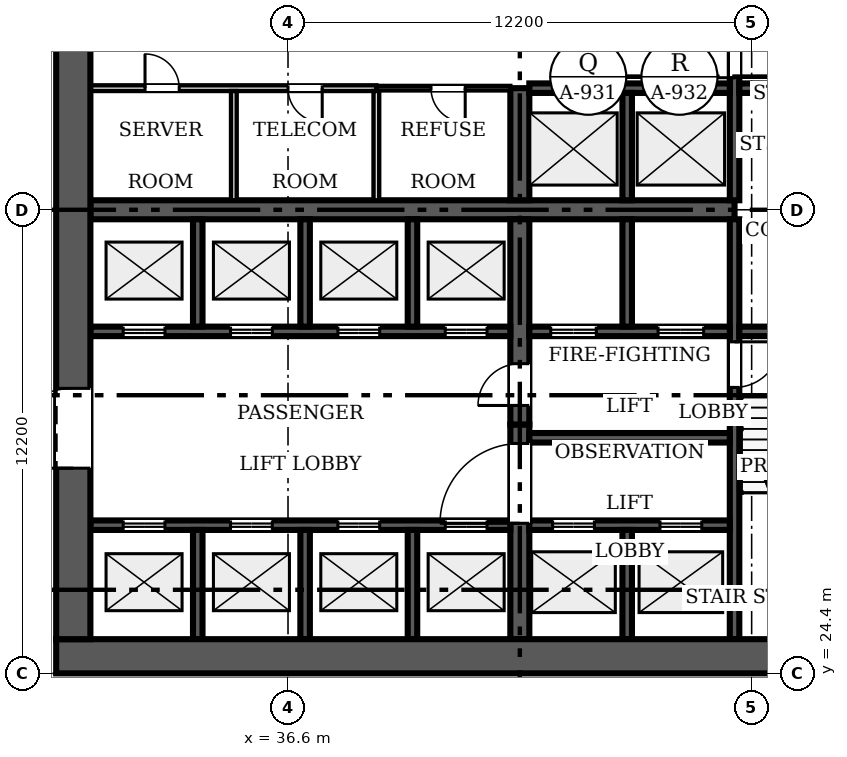
"""IFC4 building model, lengths in metres.
Left out: names, types, materials, properties, quantities, classifications, styles, units other than length and angle.
Written with IfcOpenShell. Run it as: python <this file> out.ifc"""

import sys

from ifc_helpers import new_model, si_unit, direction, frame, frame_2d, origin, place, context, subcontext, project, spatial, rectangle, extrude, source, transform, mapped, element, fill, save


model = new_model("IFC4")
c1 = context("Model", 3, precision=1e-05, world=origin(), true_north=direction((0.0, 1.0)))
c2 = subcontext(c1, "Body", "Model", "MODEL_VIEW")
j1 = project(units=[si_unit("LENGTHUNIT", "METRE"), si_unit("PLANEANGLEUNIT", "RADIAN")], contexts=[c1])
p1 = place(None, origin())
s1 = spatial("IfcSite", under=j1, at=p1, CompositionType="ELEMENT")
p2 = place(p1, origin())
s2 = spatial("IfcBuilding", under=s1, at=p2, CompositionType="ELEMENT")
p3 = place(p2, origin())
s3 = spatial("IfcBuildingStorey", under=s2, at=p3, CompositionType="ELEMENT", Elevation=0.0)
p4 = place(p3, frame((54.9, 24.85, 0.0), z_axis=(0.0, 0.0, 1.0), x_axis=(-1.0, 0.0, 0.0)))
e1 = element("IfcWall", 1, at=p4, inside=s3, PredefinedType="SHEAR", context=c2, shape_type="SweptSolid", body=[
    extrude(rectangle(XDim=24.4, YDim=0.9, at=frame_2d((12.2, 0.0))), origin(), (0.0, 0.0, 1.0), 7.2),
])
p5 = place(p3, frame((30.95, 25.3, 0.0), z_axis=(0.0, 0.0, 1.0), x_axis=(0.0, 1.0, 0.0)))
e2 = element("IfcWall", 2, at=p5, inside=s3, PredefinedType="SHEAR", context=c2, shape_type="SweptSolid", body=[
    extrude(rectangle(XDim=22.6, YDim=0.9, at=frame_2d((11.3, 0.0))), origin(), (0.0, 0.0, 1.0), 7.2),
])
m1 = source(origin(), c2, "Body", "SweptSolid", [
    extrude(rectangle(XDim=2.1, YDim=2.4, at=frame_2d((1.05, 1.2))), frame((0.0, 0.46, 0.0), z_axis=(0.0, -1.0, 0.0), x_axis=(1.0, 0.0, 0.0)), (0.0, 0.0, 1.0), 0.92),
])
p6 = place(p5, frame((4.5, 0.0, 0.0)))
e3 = element("IfcOpeningElement", 3, at=p6, cuts=e2, PredefinedType="OPENING", context=c2, shape_type="MappedRepresentation", body=[
    mapped(m1, transform((0.0, 0.0, 0.0), scale=1.0)),
])
p7 = place(p5, frame((16.0, 0.0, 0.0)))
e4 = element("IfcOpeningElement", 4, at=p7, cuts=e2, PredefinedType="OPENING", context=c2, shape_type="MappedRepresentation", body=[
    mapped(m1, transform((0.0, 0.0, 0.0), scale=1.0)),
])
p8 = place(p3, frame((31.4, 36.6, 0.0), z_axis=(0.0, 0.0, 1.0), x_axis=(1.0, 0.0, 0.0)))
e5 = element("IfcWall", 5, at=p8, inside=s3, PredefinedType="SHEAR", context=c2, shape_type="SweptSolid", body=[
    extrude(rectangle(XDim=16.95, YDim=0.5, at=frame_2d((8.475, 0.0))), origin(), (0.0, 0.0, 1.0), 7.2),
])
p9 = place(p3, frame((42.7, 25.3, 0.0), z_axis=(0.0, 0.0, 1.0), x_axis=(0.0, 1.0, 0.0)))
e6 = element("IfcWall", 6, at=p9, inside=s3, PredefinedType="SHEAR", context=c2, shape_type="SweptSolid", body=[
    extrude(rectangle(XDim=5.65, YDim=0.5, at=frame_2d((2.825, 0.0))), origin(), (0.0, 0.0, 1.0), 7.2),
])
m2 = source(origin(), c2, "Body", "SweptSolid", [
    extrude(rectangle(XDim=2.1, YDim=2.4, at=frame_2d((1.05, 1.2))), frame((0.0, 0.26, 0.0), z_axis=(0.0, -1.0, 0.0), x_axis=(1.0, 0.0, 0.0)), (0.0, 0.0, 1.0), 0.52),
])
p10 = place(p9, frame((3.05, 0.0, 0.0)))
e7 = element("IfcOpeningElement", 7, at=p10, cuts=e6, PredefinedType="OPENING", context=c2, shape_type="MappedRepresentation", body=[
    mapped(m2, transform((0.0, 0.0, 0.0), scale=1.0)),
])
p11 = place(p3, frame((42.7, 36.35, 0.0), z_axis=(0.0, 0.0, 1.0), x_axis=(0.0, -1.0, 0.0)))
e8 = element("IfcWall", 8, at=p11, inside=s3, PredefinedType="SHEAR", context=c2, shape_type="SweptSolid", body=[
    extrude(rectangle(XDim=5.4, YDim=0.5, at=frame_2d((2.7, 0.0))), origin(), (0.0, 0.0, 1.0), 7.2),
])
m3 = source(origin(), c2, "Body", "SweptSolid", [
    extrude(rectangle(XDim=1.1, YDim=2.1, at=frame_2d((0.55, 1.05))), frame((0.0, 0.26, 0.0), z_axis=(0.0, -1.0, 0.0), x_axis=(1.0, 0.0, 0.0)), (0.0, 0.0, 1.0), 0.52),
])
p12 = place(p11, frame((3.8, 0.0, 0.0)))
e9 = element("IfcOpeningElement", 9, at=p12, cuts=e8, PredefinedType="OPENING", context=c2, shape_type="MappedRepresentation", body=[
    mapped(m3, transform((0.0, 0.0, 0.0), scale=1.0)),
])
p13 = place(p3, frame((42.7, 36.85, 0.0), z_axis=(0.0, 0.0, 1.0), x_axis=(0.0, 1.0, 0.0)))
e10 = element("IfcWall", 10, at=p13, inside=s3, PredefinedType="SHEAR", context=c2, shape_type="SweptSolid", body=[
    extrude(rectangle(XDim=2.95, YDim=0.5, at=frame_2d((1.475, 0.0))), origin(), (0.0, 0.0, 1.0), 7.2),
])
p14 = place(p3, frame((48.35, 36.35, 0.0), z_axis=(0.0, 0.0, 1.0), x_axis=(0.0, -1.0, 0.0)))
e11 = element("IfcWall", 11, at=p14, inside=s3, PredefinedType="SOLIDWALL", context=c2, shape_type="SweptSolid", body=[
    extrude(rectangle(XDim=11.05, YDim=0.25, at=frame_2d((5.525, 0.0))), origin(), (0.0, 0.0, 1.0), 7.2),
])
m4 = source(origin(), c2, "Body", "SweptSolid", [
    extrude(rectangle(XDim=1.2, YDim=2.1, at=frame_2d((0.6, 1.05))), frame((0.0, 0.135, 0.0), z_axis=(0.0, -1.0, 0.0), x_axis=(1.0, 0.0, 0.0)), (0.0, 0.0, 1.0), 0.27),
])
p15 = place(p14, frame((3.225, 0.0, 0.0)))
e12 = element("IfcOpeningElement", 12, at=p15, cuts=e11, PredefinedType="OPENING", context=c2, shape_type="MappedRepresentation", body=[
    mapped(m4, transform((0.0, 0.0, 0.0), scale=1.0)),
])
p16 = place(p3, frame((48.35, 47.9, 0.0), z_axis=(0.0, 0.0, 1.0), x_axis=(0.0, -1.0, 0.0)))
e13 = element("IfcWall", 13, at=p16, inside=s3, PredefinedType="SOLIDWALL", context=c2, shape_type="SweptSolid", body=[
    extrude(rectangle(XDim=11.05, YDim=0.25, at=frame_2d((5.525, 0.0))), origin(), (0.0, 0.0, 1.0), 7.2),
])
p17 = place(p16, frame((6.625, 0.0, 0.0)))
e14 = element("IfcOpeningElement", 14, at=p17, cuts=e13, PredefinedType="OPENING", context=c2, shape_type="MappedRepresentation", body=[
    mapped(m4, transform((0.0, 0.0, 0.0), scale=1.0)),
])
p18 = place(p3, frame((42.45, 33.4, 0.0), z_axis=(0.0, 0.0, 1.0), x_axis=(-1.0, 0.0, 0.0)))
e15 = element("IfcWall", 15, at=p18, inside=s3, PredefinedType="SOLIDWALL", context=c2, shape_type="SweptSolid", body=[
    extrude(rectangle(XDim=11.05, YDim=0.25, at=frame_2d((5.525, 0.0))), origin(), (0.0, 0.0, 1.0), 7.2),
])
m5 = source(origin(), c2, "Body", "SweptSolid", [
    extrude(rectangle(XDim=1.1, YDim=2.1, at=frame_2d((0.55, 1.05))), frame((0.0, 0.135, 0.0), z_axis=(0.0, -1.0, 0.0), x_axis=(1.0, 0.0, 0.0)), (0.0, 0.0, 1.0), 0.27),
])
p19 = place(p18, frame((9.087, 0.0, 0.0)))
e16 = element("IfcOpeningElement", 16, at=p19, cuts=e15, PredefinedType="OPENING", context=c2, shape_type="MappedRepresentation", body=[
    mapped(m5, transform((0.0, 0.0, 0.0), scale=1.0)),
])
p20 = place(p18, frame((6.262, 0.0, 0.0)))
e17 = element("IfcOpeningElement", 17, at=p20, cuts=e15, PredefinedType="OPENING", context=c2, shape_type="MappedRepresentation", body=[
    mapped(m5, transform((0.0, 0.0, 0.0), scale=1.0)),
])
p21 = place(p18, frame((3.438, 0.0, 0.0)))
e18 = element("IfcOpeningElement", 18, at=p21, cuts=e15, PredefinedType="OPENING", context=c2, shape_type="MappedRepresentation", body=[
    mapped(m5, transform((0.0, 0.0, 0.0), scale=1.0)),
])
p22 = place(p18, frame((0.613, 0.0, 0.0)))
e19 = element("IfcOpeningElement", 19, at=p22, cuts=e15, PredefinedType="OPENING", context=c2, shape_type="MappedRepresentation", body=[
    mapped(m5, transform((0.0, 0.0, 0.0), scale=1.0)),
])
p23 = place(p3, frame((48.225, 33.4, 0.0), z_axis=(0.0, 0.0, 1.0), x_axis=(-1.0, 0.0, 0.0)))
e20 = element("IfcWall", 20, at=p23, inside=s3, PredefinedType="SOLIDWALL", context=c2, shape_type="SweptSolid", body=[
    extrude(rectangle(XDim=5.275, YDim=0.25, at=frame_2d((2.638, 0.0))), origin(), (0.0, 0.0, 1.0), 7.2),
])
p24 = place(p23, frame((3.512, 0.0, 0.0)))
e21 = element("IfcOpeningElement", 21, at=p24, cuts=e20, PredefinedType="OPENING", context=c2, shape_type="MappedRepresentation", body=[
    mapped(m4, transform((0.0, 0.0, 0.0), scale=1.0)),
])
p25 = place(p23, frame((0.688, 0.0, 0.0)))
e22 = element("IfcOpeningElement", 22, at=p25, cuts=e20, PredefinedType="OPENING", context=c2, shape_type="MappedRepresentation", body=[
    mapped(m4, transform((0.0, 0.0, 0.0), scale=1.0)),
])
p26 = place(p3, frame((48.475, 33.4, 0.0), z_axis=(0.0, 0.0, 1.0), x_axis=(1.0, 0.0, 0.0)))
e23 = element("IfcWall", 23, at=p26, inside=s3, PredefinedType="SOLIDWALL", context=c2, shape_type="SweptSolid", body=[
    extrude(rectangle(XDim=3.4, YDim=0.25, at=frame_2d((1.7, 0.0))), origin(), (0.0, 0.0, 1.0), 7.2),
])
p27 = place(p3, frame((31.4, 28.3, 0.0), z_axis=(0.0, 0.0, 1.0), x_axis=(1.0, 0.0, 0.0)))
e24 = element("IfcWall", 24, at=p27, inside=s3, PredefinedType="SOLIDWALL", context=c2, shape_type="SweptSolid", body=[
    extrude(rectangle(XDim=11.05, YDim=0.25, at=frame_2d((5.525, 0.0))), origin(), (0.0, 0.0, 1.0), 7.2),
])
p28 = place(p27, frame((0.863, 0.0, 0.0)))
e25 = element("IfcOpeningElement", 25, at=p28, cuts=e24, PredefinedType="OPENING", context=c2, shape_type="MappedRepresentation", body=[
    mapped(m5, transform((0.0, 0.0, 0.0), scale=1.0)),
])
p29 = place(p27, frame((3.688, 0.0, 0.0)))
e26 = element("IfcOpeningElement", 26, at=p29, cuts=e24, PredefinedType="OPENING", context=c2, shape_type="MappedRepresentation", body=[
    mapped(m5, transform((0.0, 0.0, 0.0), scale=1.0)),
])
p30 = place(p27, frame((6.512, 0.0, 0.0)))
e27 = element("IfcOpeningElement", 27, at=p30, cuts=e24, PredefinedType="OPENING", context=c2, shape_type="MappedRepresentation", body=[
    mapped(m5, transform((0.0, 0.0, 0.0), scale=1.0)),
])
p31 = place(p27, frame((9.337, 0.0, 0.0)))
e28 = element("IfcOpeningElement", 28, at=p31, cuts=e24, PredefinedType="OPENING", context=c2, shape_type="MappedRepresentation", body=[
    mapped(m5, transform((0.0, 0.0, 0.0), scale=1.0)),
])
p32 = place(p3, frame((42.95, 28.3, 0.0), z_axis=(0.0, 0.0, 1.0), x_axis=(1.0, 0.0, 0.0)))
e29 = element("IfcWall", 29, at=p32, inside=s3, PredefinedType="SOLIDWALL", context=c2, shape_type="SweptSolid", body=[
    extrude(rectangle(XDim=5.275, YDim=0.25, at=frame_2d((2.638, 0.0))), origin(), (0.0, 0.0, 1.0), 7.2),
])
p33 = place(p32, frame((0.613, 0.0, 0.0)))
e30 = element("IfcOpeningElement", 30, at=p33, cuts=e29, PredefinedType="OPENING", context=c2, shape_type="MappedRepresentation", body=[
    mapped(m5, transform((0.0, 0.0, 0.0), scale=1.0)),
])
p34 = place(p32, frame((3.438, 0.0, 0.0)))
e31 = element("IfcOpeningElement", 31, at=p34, cuts=e29, PredefinedType="OPENING", context=c2, shape_type="MappedRepresentation", body=[
    mapped(m5, transform((0.0, 0.0, 0.0), scale=1.0)),
])
p35 = place(p3, frame((42.95, 39.8, 0.0), z_axis=(0.0, 0.0, 1.0), x_axis=(1.0, 0.0, 0.0)))
e32 = element("IfcWall", 32, at=p35, inside=s3, PredefinedType="SOLIDWALL", context=c2, shape_type="SweptSolid", body=[
    extrude(rectangle(XDim=5.275, YDim=0.25, at=frame_2d((2.638, 0.0))), origin(), (0.0, 0.0, 1.0), 7.2),
])
p36 = place(p35, frame((0.613, 0.0, 0.0)))
e33 = element("IfcOpeningElement", 33, at=p36, cuts=e32, PredefinedType="OPENING", context=c2, shape_type="MappedRepresentation", body=[
    mapped(m5, transform((0.0, 0.0, 0.0), scale=1.0)),
])
p37 = place(p35, frame((3.438, 0.0, 0.0)))
e34 = element("IfcOpeningElement", 34, at=p37, cuts=e32, PredefinedType="OPENING", context=c2, shape_type="MappedRepresentation", body=[
    mapped(m5, transform((0.0, 0.0, 0.0), scale=1.0)),
])
p38 = place(p3, frame((48.475, 39.8, 0.0), z_axis=(0.0, 0.0, 1.0), x_axis=(1.0, 0.0, 0.0)))
e35 = element("IfcWall", 35, at=p38, inside=s3, PredefinedType="SOLIDWALL", context=c2, shape_type="SweptSolid", body=[
    extrude(rectangle(XDim=3.4, YDim=0.25, at=frame_2d((1.7, 0.0))), origin(), (0.0, 0.0, 1.0), 7.2),
])
p39 = place(p3, frame((45.525, 33.525, 0.0), z_axis=(0.0, 0.0, 1.0), x_axis=(0.0, 1.0, 0.0)))
e36 = element("IfcWall", 36, at=p39, inside=s3, PredefinedType="SOLIDWALL", context=c2, shape_type="SweptSolid", body=[
    extrude(rectangle(XDim=2.825, YDim=0.25, at=frame_2d((1.413, 0.0))), origin(), (0.0, 0.0, 1.0), 7.2),
])
p40 = place(p3, frame((45.525, 36.85, 0.0), z_axis=(0.0, 0.0, 1.0), x_axis=(0.0, 1.0, 0.0)))
e37 = element("IfcWall", 37, at=p40, inside=s3, PredefinedType="SOLIDWALL", context=c2, shape_type="SweptSolid", body=[
    extrude(rectangle(XDim=2.825, YDim=0.25, at=frame_2d((1.413, 0.0))), origin(), (0.0, 0.0, 1.0), 7.2),
])
p41 = place(p3, frame((42.95, 30.6, 0.0), z_axis=(0.0, 0.0, 1.0), x_axis=(1.0, 0.0, 0.0)))
e38 = element("IfcWall", 38, at=p41, inside=s3, PredefinedType="SOLIDWALL", context=c2, shape_type="SweptSolid", body=[
    extrude(rectangle(XDim=5.275, YDim=0.25, at=frame_2d((2.638, 0.0))), origin(), (0.0, 0.0, 1.0), 7.2),
])
for number, where, z_axis, x_axis in (
    (39, (34.225, 33.525, 0.0), (0.0, 0.0, 1.0), (0.0, 1.0, 0.0)),
    (40, (37.05, 33.525, 0.0), (0.0, 0.0, 1.0), (0.0, 1.0, 0.0)),
    (41, (39.875, 33.525, 0.0), (0.0, 0.0, 1.0), (0.0, 1.0, 0.0)),
):
    element("IfcWall", number, at=place(p3, frame(where, z_axis=z_axis, x_axis=x_axis)), inside=s3, PredefinedType="SOLIDWALL", context=c2, shape_type="SweptSolid", body=[
        extrude(rectangle(XDim=2.825, YDim=0.25, at=frame_2d((1.413, 0.0))), origin(), (0.0, 0.0, 1.0), 7.2),
    ])
for number, where, z_axis, x_axis in (
    (42, (34.225, 25.3, 0.0), (0.0, 0.0, 1.0), (0.0, 1.0, 0.0)),
    (43, (37.05, 25.3, 0.0), (0.0, 0.0, 1.0), (0.0, 1.0, 0.0)),
    (44, (39.875, 25.3, 0.0), (0.0, 0.0, 1.0), (0.0, 1.0, 0.0)),
    (45, (45.525, 25.3, 0.0), (0.0, 0.0, 1.0), (0.0, 1.0, 0.0)),
):
    element("IfcWall", number, at=place(p3, frame(where, z_axis=z_axis, x_axis=x_axis)), inside=s3, PredefinedType="SOLIDWALL", context=c2, shape_type="SweptSolid", body=[
        extrude(rectangle(XDim=2.875, YDim=0.25, at=frame_2d((1.438, 0.0))), origin(), (0.0, 0.0, 1.0), 7.2),
    ])
p42 = place(p3, frame((38.925, 39.8, 0.0), z_axis=(0.0, 0.0, 1.0), x_axis=(-1.0, 0.0, 0.0)))
e46 = element("IfcWall", 46, at=p42, inside=s3, PredefinedType="PARTITIONING", context=c2, shape_type="SweptSolid", body=[
    extrude(rectangle(XDim=7.525, YDim=0.15, at=frame_2d((3.763, 0.0))), origin(), (0.0, 0.0, 1.0), 6.95),
])
m6 = source(origin(), c2, "Body", "SweptSolid", [
    extrude(rectangle(XDim=0.9, YDim=2.1, at=frame_2d((0.45, 1.05))), frame((0.0, 0.085, 0.0), z_axis=(0.0, -1.0, 0.0), x_axis=(1.0, 0.0, 0.0)), (0.0, 0.0, 1.0), 0.17),
])
p43 = place(p42, frame((5.188, 0.0, 0.0)))
e47 = element("IfcOpeningElement", 47, at=p43, cuts=e46, PredefinedType="OPENING", context=c2, shape_type="MappedRepresentation", body=[
    mapped(m6, transform((0.0, 0.0, 0.0), scale=1.0)),
])
p44 = place(p42, frame((1.425, 0.0, 0.0)))
e48 = element("IfcOpeningElement", 48, at=p44, cuts=e46, PredefinedType="OPENING", context=c2, shape_type="MappedRepresentation", body=[
    mapped(m6, transform((0.0, 0.0, 0.0), scale=1.0)),
])
p45 = place(p3, frame((42.45, 39.8, 0.0), z_axis=(0.0, 0.0, 1.0), x_axis=(-1.0, 0.0, 0.0)))
e49 = element("IfcWall", 49, at=p45, inside=s3, PredefinedType="PARTITIONING", context=c2, shape_type="SweptSolid", body=[
    extrude(rectangle(XDim=3.525, YDim=0.12, at=frame_2d((1.762, 0.0))), origin(), (0.0, 0.0, 1.0), 6.95),
])
m7 = source(origin(), c2, "Body", "SweptSolid", [
    extrude(rectangle(XDim=0.9, YDim=2.1, at=frame_2d((0.45, 1.05))), frame((0.0, 0.07, 0.0), z_axis=(0.0, -1.0, 0.0), x_axis=(1.0, 0.0, 0.0)), (0.0, 0.0, 1.0), 0.14),
])
p46 = place(p45, frame((1.188, 0.0, 0.0)))
e50 = element("IfcOpeningElement", 50, at=p46, cuts=e49, PredefinedType="OPENING", context=c2, shape_type="MappedRepresentation", body=[
    mapped(m7, transform((0.0, 0.0, 0.0), scale=1.0)),
])
for number, where, z_axis, x_axis in (
    (51, (35.175, 36.85, 0.0), (0.0, 0.0, 1.0), (0.0, 1.0, 0.0)),
    (52, (38.925, 36.85, 0.0), (0.0, 0.0, 1.0), (0.0, 1.0, 0.0)),
):
    element("IfcWall", number, at=place(p3, frame(where, z_axis=z_axis, x_axis=x_axis)), inside=s3, PredefinedType="PARTITIONING", context=c2, shape_type="SweptSolid", body=[
        extrude(rectangle(XDim=2.875, YDim=0.15, at=frame_2d((1.438, 0.0))), origin(), (0.0, 0.0, 1.0), 6.95),
    ])
m8 = source(origin(), c2, "Body", "SweptSolid", [
    extrude(rectangle(XDim=2.1, YDim=2.4, at=frame_2d((1.05, 1.2))), frame((0.0, 0.025, 0.0), z_axis=(0.0, -1.0, 0.0), x_axis=(1.0, 0.0, 0.0)), (0.0, 0.0, 1.0), 0.05),
])
p47 = place(p6, origin())
e53 = element("IfcDoor", 53, at=p47, inside=s3, OperationType="DOUBLE_DOOR_SINGLE_SWING", PredefinedType="DOOR", context=c2, shape_type="MappedRepresentation", body=[
    mapped(m8, transform((0.0, 0.0, 0.0), scale=1.0)),
])
fill(e3, e53)
p48 = place(p10, origin())
e54 = element("IfcDoor", 54, at=p48, inside=s3, OperationType="DOUBLE_DOOR_SINGLE_SWING", PredefinedType="DOOR", context=c2, shape_type="MappedRepresentation", body=[
    mapped(m8, transform((0.0, 0.0, 0.0), scale=1.0)),
])
fill(e7, e54)
m9 = source(origin(), c2, "Body", "SweptSolid", [
    extrude(rectangle(XDim=1.1, YDim=2.1, at=frame_2d((0.55, 1.05))), frame((0.0, 0.025, 0.0), z_axis=(0.0, -1.0, 0.0), x_axis=(1.0, 0.0, 0.0)), (0.0, 0.0, 1.0), 0.05),
])
p49 = place(p12, origin())
e55 = element("IfcDoor", 55, at=p49, inside=s3, OperationType="SINGLE_SWING_RIGHT", PredefinedType="DOOR", context=c2, shape_type="MappedRepresentation", body=[
    mapped(m9, transform((0.0, 0.0, 0.0), scale=1.0)),
])
fill(e9, e55)
m10 = source(origin(), c2, "Body", "SweptSolid", [
    extrude(rectangle(XDim=1.2, YDim=2.1, at=frame_2d((0.6, 1.05))), frame((0.0, 0.025, 0.0), z_axis=(0.0, -1.0, 0.0), x_axis=(1.0, 0.0, 0.0)), (0.0, 0.0, 1.0), 0.05),
])
p50 = place(p15, origin())
e56 = element("IfcDoor", 56, at=p50, inside=s3, OperationType="SINGLE_SWING_LEFT", PredefinedType="DOOR", context=c2, shape_type="MappedRepresentation", body=[
    mapped(m10, transform((0.0, 0.0, 0.0), scale=1.0)),
])
fill(e12, e56)
p51 = place(p17, origin())
e57 = element("IfcDoor", 57, at=p51, inside=s3, OperationType="SINGLE_SWING_RIGHT", PredefinedType="DOOR", context=c2, shape_type="MappedRepresentation", body=[
    mapped(m10, transform((0.0, 0.0, 0.0), scale=1.0)),
])
fill(e14, e57)
p52 = place(p19, origin())
e58 = element("IfcDoor", 58, at=p52, inside=s3, OperationType="DOUBLE_DOOR_SLIDING", PredefinedType="DOOR", context=c2, shape_type="MappedRepresentation", body=[
    mapped(m9, transform((0.0, 0.0, 0.0), scale=1.0)),
])
fill(e16, e58)
p53 = place(p20, origin())
e59 = element("IfcDoor", 59, at=p53, inside=s3, OperationType="DOUBLE_DOOR_SLIDING", PredefinedType="DOOR", context=c2, shape_type="MappedRepresentation", body=[
    mapped(m9, transform((0.0, 0.0, 0.0), scale=1.0)),
])
fill(e17, e59)
p54 = place(p21, origin())
e60 = element("IfcDoor", 60, at=p54, inside=s3, OperationType="DOUBLE_DOOR_SLIDING", PredefinedType="DOOR", context=c2, shape_type="MappedRepresentation", body=[
    mapped(m9, transform((0.0, 0.0, 0.0), scale=1.0)),
])
fill(e18, e60)
p55 = place(p22, origin())
e61 = element("IfcDoor", 61, at=p55, inside=s3, OperationType="DOUBLE_DOOR_SLIDING", PredefinedType="DOOR", context=c2, shape_type="MappedRepresentation", body=[
    mapped(m9, transform((0.0, 0.0, 0.0), scale=1.0)),
])
fill(e19, e61)
p56 = place(p24, origin())
e62 = element("IfcDoor", 62, at=p56, inside=s3, OperationType="DOUBLE_DOOR_SLIDING", PredefinedType="DOOR", context=c2, shape_type="MappedRepresentation", body=[
    mapped(m10, transform((0.0, 0.0, 0.0), scale=1.0)),
])
fill(e21, e62)
p57 = place(p25, origin())
e63 = element("IfcDoor", 63, at=p57, inside=s3, OperationType="DOUBLE_DOOR_SLIDING", PredefinedType="DOOR", context=c2, shape_type="MappedRepresentation", body=[
    mapped(m10, transform((0.0, 0.0, 0.0), scale=1.0)),
])
fill(e22, e63)
p58 = place(p28, origin())
e64 = element("IfcDoor", 64, at=p58, inside=s3, OperationType="DOUBLE_DOOR_SLIDING", PredefinedType="DOOR", context=c2, shape_type="MappedRepresentation", body=[
    mapped(m9, transform((0.0, 0.0, 0.0), scale=1.0)),
])
fill(e25, e64)
p59 = place(p29, origin())
e65 = element("IfcDoor", 65, at=p59, inside=s3, OperationType="DOUBLE_DOOR_SLIDING", PredefinedType="DOOR", context=c2, shape_type="MappedRepresentation", body=[
    mapped(m9, transform((0.0, 0.0, 0.0), scale=1.0)),
])
fill(e26, e65)
p60 = place(p30, origin())
e66 = element("IfcDoor", 66, at=p60, inside=s3, OperationType="DOUBLE_DOOR_SLIDING", PredefinedType="DOOR", context=c2, shape_type="MappedRepresentation", body=[
    mapped(m9, transform((0.0, 0.0, 0.0), scale=1.0)),
])
fill(e27, e66)
p61 = place(p31, origin())
e67 = element("IfcDoor", 67, at=p61, inside=s3, OperationType="DOUBLE_DOOR_SLIDING", PredefinedType="DOOR", context=c2, shape_type="MappedRepresentation", body=[
    mapped(m9, transform((0.0, 0.0, 0.0), scale=1.0)),
])
fill(e28, e67)
p62 = place(p33, origin())
e68 = element("IfcDoor", 68, at=p62, inside=s3, OperationType="DOUBLE_DOOR_SLIDING", PredefinedType="DOOR", context=c2, shape_type="MappedRepresentation", body=[
    mapped(m9, transform((0.0, 0.0, 0.0), scale=1.0)),
])
fill(e30, e68)
p63 = place(p34, origin())
e69 = element("IfcDoor", 69, at=p63, inside=s3, OperationType="DOUBLE_DOOR_SLIDING", PredefinedType="DOOR", context=c2, shape_type="MappedRepresentation", body=[
    mapped(m9, transform((0.0, 0.0, 0.0), scale=1.0)),
])
fill(e31, e69)
p64 = place(p36, origin())
e70 = element("IfcDoor", 70, at=p64, inside=s3, OperationType="DOUBLE_DOOR_SLIDING", PredefinedType="DOOR", context=c2, shape_type="MappedRepresentation", body=[
    mapped(m9, transform((0.0, 0.0, 0.0), scale=1.0)),
])
fill(e33, e70)
p65 = place(p37, origin())
e71 = element("IfcDoor", 71, at=p65, inside=s3, OperationType="DOUBLE_DOOR_SLIDING", PredefinedType="DOOR", context=c2, shape_type="MappedRepresentation", body=[
    mapped(m9, transform((0.0, 0.0, 0.0), scale=1.0)),
])
fill(e34, e71)
m11 = source(origin(), c2, "Body", "SweptSolid", [
    extrude(rectangle(XDim=0.9, YDim=2.1, at=frame_2d((0.45, 1.05))), frame((0.0, 0.025, 0.0), z_axis=(0.0, -1.0, 0.0), x_axis=(1.0, 0.0, 0.0)), (0.0, 0.0, 1.0), 0.05),
])
p66 = place(p43, origin())
e72 = element("IfcDoor", 72, at=p66, inside=s3, OperationType="SINGLE_SWING_RIGHT", PredefinedType="DOOR", context=c2, shape_type="MappedRepresentation", body=[
    mapped(m11, transform((0.0, 0.0, 0.0), scale=1.0)),
])
fill(e47, e72)
p67 = place(p44, origin())
e73 = element("IfcDoor", 73, at=p67, inside=s3, OperationType="SINGLE_SWING_LEFT", PredefinedType="DOOR", context=c2, shape_type="MappedRepresentation", body=[
    mapped(m11, transform((0.0, 0.0, 0.0), scale=1.0)),
])
fill(e48, e73)
p68 = place(p46, origin())
e74 = element("IfcDoor", 74, at=p68, inside=s3, OperationType="SINGLE_SWING_LEFT", PredefinedType="DOOR", context=c2, shape_type="MappedRepresentation", body=[
    mapped(m11, transform((0.0, 0.0, 0.0), scale=1.0)),
])
fill(e50, e74)
save(model, sys.argv[1])
